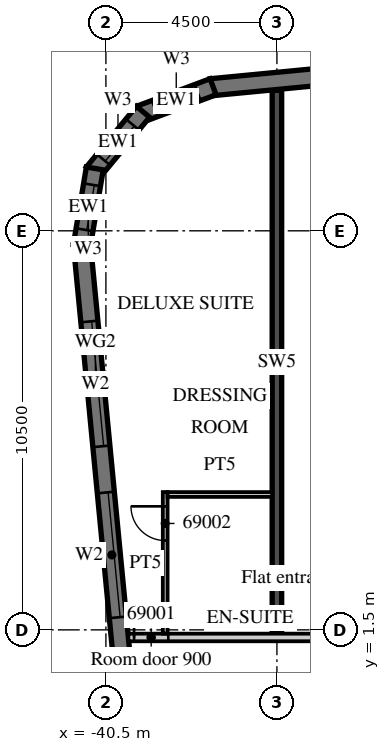
"""IFC4 building model, lengths in metres.
Left out: names, types, materials, properties, quantities, classifications, styles, units other than length and angle.
Written with IfcOpenShell. Run it as: python <this file> out.ifc"""

import sys

from ifc_helpers import new_model, si_unit, direction, frame, frame_2d, origin, place, context, subcontext, project, spatial, polyline, rectangle, outline, extrude, element, fill, save


model = new_model("IFC4")
c1 = context("Model", 3, precision=1e-05, world=origin(), true_north=direction((0.0, 1.0)))
c2 = subcontext(c1, "Body", "Model", "MODEL_VIEW")
j1 = project(units=[si_unit("LENGTHUNIT", "METRE"), si_unit("PLANEANGLEUNIT", "RADIAN")], contexts=[c1])
p1 = place(None, origin())
s1 = spatial("IfcSite", under=j1, at=p1, CompositionType="ELEMENT")
p2 = place(p1, origin())
s2 = spatial("IfcBuilding", under=s1, at=p2, CompositionType="ELEMENT")
p3 = place(p2, frame((0.0, 0.0, 278.4)))
s3 = spatial("IfcBuildingStorey", under=s2, at=p3, CompositionType="ELEMENT", Elevation=278.4)
p4 = place(p3, frame((-36.0, 1.4, 0.0), z_axis=(0.0, 0.0, 1.0), x_axis=(0.0, 1.0, 0.0)))
e1 = element("IfcWall", 1, at=p4, inside=s3, PredefinedType="SHEAR", context=c2, shape_type="SweptSolid", body=[
    extrude(rectangle(XDim=14.296, YDim=0.25, at=frame_2d((7.148, 0.0))), origin(), (0.0, 0.0, 1.0), 3.3),
])
p5 = place(p3, frame((-41.132, 11.658, 0.0), z_axis=(0.0, 0.0, 1.0), x_axis=(0.095847749461, -0.995396006082, 0.0)))
e2 = element("IfcWall", 2, at=p5, inside=s3, PredefinedType="SOLIDWALL", context=c2, shape_type="SweptSolid", body=[
    extrude(rectangle(XDim=32.0, YDim=0.45, at=frame_2d((16.0, 0.0))), origin(), (0.0, 0.0, 1.0), 3.02),
])
p6 = place(p5, frame((2.053, 0.0, 0.45)))
e3 = element("IfcOpeningElement", 3, at=p6, cuts=e2, PredefinedType="OPENING", context=c2, shape_type="SweptSolid", body=[
    extrude(rectangle(XDim=3.3, YDim=2.25, at=frame_2d((1.65, 1.125))), frame((0.0, 0.235, 0.0), z_axis=(0.0, -1.0, 0.0), x_axis=(1.0, 0.0, 0.0)), (0.0, 0.0, 1.0), 0.47),
])
p7 = place(p5, frame((6.574, 0.0, 0.45)))
e4 = element("IfcOpeningElement", 4, at=p7, cuts=e2, PredefinedType="OPENING", context=c2, shape_type="SweptSolid", body=[
    extrude(rectangle(XDim=3.3, YDim=2.25, at=frame_2d((1.65, 1.125))), frame((0.0, 0.235, 0.0), z_axis=(0.0, -1.0, 0.0), x_axis=(1.0, 0.0, 0.0)), (0.0, 0.0, 1.0), 0.47),
])
p8 = place(p3, frame((13.521, 20.713, 0.0), z_axis=(0.0, 0.0, 1.0), x_axis=(-0.995396277313, -0.095844932638, 0.0)))
e5 = element("IfcWall", 5, at=p8, inside=s3, PredefinedType="SOLIDWALL", context=c2, shape_type="SweptSolid", body=[
    extrude(rectangle(XDim=51.495, YDim=0.45, at=frame_2d((25.748, 0.0))), origin(), (0.0, 0.0, 1.0), 3.02),
])
p9 = place(p8, frame((0.91, 0.0, 0.45)))
e6 = element("IfcOpeningElement", 6, at=p9, cuts=e5, PredefinedType="OPENING", context=c2, shape_type="SweptSolid", body=[
    extrude(rectangle(XDim=2.7, YDim=2.25, at=frame_2d((1.35, 1.125))), frame((0.0, 0.235, 0.0), z_axis=(0.0, -1.0, 0.0), x_axis=(1.0, 0.0, 0.0)), (0.0, 0.0, 1.0), 0.47),
])
p10 = place(p8, frame((5.431, 0.0, 0.45)))
e7 = element("IfcOpeningElement", 7, at=p10, cuts=e5, PredefinedType="OPENING", context=c2, shape_type="SweptSolid", body=[
    extrude(rectangle(XDim=2.7, YDim=2.25, at=frame_2d((1.35, 1.125))), frame((0.0, 0.235, 0.0), z_axis=(0.0, -1.0, 0.0), x_axis=(1.0, 0.0, 0.0)), (0.0, 0.0, 1.0), 0.47),
])
p11 = place(p8, frame((9.952, 0.0, 0.45)))
e8 = element("IfcOpeningElement", 8, at=p11, cuts=e5, PredefinedType="OPENING", context=c2, shape_type="SweptSolid", body=[
    extrude(rectangle(XDim=2.7, YDim=2.25, at=frame_2d((1.35, 1.125))), frame((0.0, 0.235, 0.0), z_axis=(0.0, -1.0, 0.0), x_axis=(1.0, 0.0, 0.0)), (0.0, 0.0, 1.0), 0.47),
])
p12 = place(p8, frame((14.473, 0.0, 0.45)))
e9 = element("IfcOpeningElement", 9, at=p12, cuts=e5, PredefinedType="OPENING", context=c2, shape_type="SweptSolid", body=[
    extrude(rectangle(XDim=2.7, YDim=2.25, at=frame_2d((1.35, 1.125))), frame((0.0, 0.235, 0.0), z_axis=(0.0, -1.0, 0.0), x_axis=(1.0, 0.0, 0.0)), (0.0, 0.0, 1.0), 0.47),
])
p13 = place(p8, frame((18.994, 0.0, 0.45)))
e10 = element("IfcOpeningElement", 10, at=p13, cuts=e5, PredefinedType="OPENING", context=c2, shape_type="SweptSolid", body=[
    extrude(rectangle(XDim=2.7, YDim=2.25, at=frame_2d((1.35, 1.125))), frame((0.0, 0.235, 0.0), z_axis=(0.0, -1.0, 0.0), x_axis=(1.0, 0.0, 0.0)), (0.0, 0.0, 1.0), 0.47),
])
p14 = place(p8, frame((23.514, 0.0, 0.45)))
e11 = element("IfcOpeningElement", 11, at=p14, cuts=e5, PredefinedType="OPENING", context=c2, shape_type="SweptSolid", body=[
    extrude(rectangle(XDim=2.7, YDim=2.25, at=frame_2d((1.35, 1.125))), frame((0.0, 0.235, 0.0), z_axis=(0.0, -1.0, 0.0), x_axis=(1.0, 0.0, 0.0)), (0.0, 0.0, 1.0), 0.47),
])
p15 = place(p8, frame((28.035, 0.0, 0.45)))
e12 = element("IfcOpeningElement", 12, at=p15, cuts=e5, PredefinedType="OPENING", context=c2, shape_type="SweptSolid", body=[
    extrude(rectangle(XDim=2.7, YDim=2.25, at=frame_2d((1.35, 1.125))), frame((0.0, 0.235, 0.0), z_axis=(0.0, -1.0, 0.0), x_axis=(1.0, 0.0, 0.0)), (0.0, 0.0, 1.0), 0.47),
])
p16 = place(p8, frame((32.556, 0.0, 0.45)))
e13 = element("IfcOpeningElement", 13, at=p16, cuts=e5, PredefinedType="OPENING", context=c2, shape_type="SweptSolid", body=[
    extrude(rectangle(XDim=2.7, YDim=2.25, at=frame_2d((1.35, 1.125))), frame((0.0, 0.235, 0.0), z_axis=(0.0, -1.0, 0.0), x_axis=(1.0, 0.0, 0.0)), (0.0, 0.0, 1.0), 0.47),
])
p17 = place(p8, frame((37.077, 0.0, 0.45)))
e14 = element("IfcOpeningElement", 14, at=p17, cuts=e5, PredefinedType="OPENING", context=c2, shape_type="SweptSolid", body=[
    extrude(rectangle(XDim=2.7, YDim=2.25, at=frame_2d((1.35, 1.125))), frame((0.0, 0.235, 0.0), z_axis=(0.0, -1.0, 0.0), x_axis=(1.0, 0.0, 0.0)), (0.0, 0.0, 1.0), 0.47),
])
p18 = place(p8, frame((41.598, 0.0, 0.45)))
e15 = element("IfcOpeningElement", 15, at=p18, cuts=e5, PredefinedType="OPENING", context=c2, shape_type="SweptSolid", body=[
    extrude(rectangle(XDim=2.7, YDim=2.25, at=frame_2d((1.35, 1.125))), frame((0.0, 0.235, 0.0), z_axis=(0.0, -1.0, 0.0), x_axis=(1.0, 0.0, 0.0)), (0.0, 0.0, 1.0), 0.47),
])
p19 = place(p8, frame((46.118, 0.0, 0.45)))
e16 = element("IfcOpeningElement", 16, at=p19, cuts=e5, PredefinedType="OPENING", context=c2, shape_type="SweptSolid", body=[
    extrude(rectangle(XDim=2.7, YDim=2.25, at=frame_2d((1.35, 1.125))), frame((0.0, 0.235, 0.0), z_axis=(0.0, -1.0, 0.0), x_axis=(1.0, 0.0, 0.0)), (0.0, 0.0, 1.0), 0.47),
])
p20 = place(p3, frame((-37.679, 15.791, 0.0), z_axis=(0.0, 0.0, 1.0), x_axis=(-0.936677599948, -0.350192909346, 0.0)))
e17 = element("IfcWall", 17, at=p20, inside=s3, PredefinedType="SOLIDWALL", context=c2, shape_type="SweptSolid", body=[
    extrude(outline(polyline([(0.0, -0.225), (2.071, -0.225), (1.95, 0.225), (0.121, 0.225), (0.0, -0.225)])), origin(), (0.0, 0.0, 1.0), 3.02),
])
p21 = place(p20, frame((0.435, 0.0, 0.45)))
e18 = element("IfcOpeningElement", 18, at=p21, cuts=e17, PredefinedType="OPENING", context=c2, shape_type="SweptSolid", body=[
    extrude(rectangle(XDim=1.2, YDim=2.25, at=frame_2d((0.6, 1.125))), frame((0.0, 0.235, 0.0), z_axis=(0.0, -1.0, 0.0), x_axis=(1.0, 0.0, 0.0)), (0.0, 0.0, 1.0), 0.47),
])
p22 = place(p3, frame((-39.524, 15.133, 0.0), z_axis=(0.0, 0.0, 1.0), x_axis=(-0.636046112757, -0.771651049663, 0.0)))
e19 = element("IfcWall", 19, at=p22, inside=s3, PredefinedType="SOLIDWALL", context=c2, shape_type="SweptSolid", body=[
    extrude(outline(polyline([(0.0, -0.225), (2.071, -0.225), (1.95, 0.225), (0.121, 0.225), (0.0, -0.225)])), origin(), (0.0, 0.0, 1.0), 3.02),
])
p23 = place(p22, frame((0.435, 0.0, 0.45)))
e20 = element("IfcOpeningElement", 20, at=p23, cuts=e19, PredefinedType="OPENING", context=c2, shape_type="SweptSolid", body=[
    extrude(rectangle(XDim=1.2, YDim=2.25, at=frame_2d((0.6, 1.125))), frame((0.0, 0.235, 0.0), z_axis=(0.0, -1.0, 0.0), x_axis=(1.0, 0.0, 0.0)), (0.0, 0.0, 1.0), 0.47),
])
p24 = place(p3, frame((-40.792, 13.641, 0.0), z_axis=(0.0, 0.0, 1.0), x_axis=(-0.165068144653, -0.986282164302, 0.0)))
e21 = element("IfcWall", 21, at=p24, inside=s3, PredefinedType="SOLIDWALL", context=c2, shape_type="SweptSolid", body=[
    extrude(outline(polyline([(0.0, -0.225), (2.071, -0.225), (1.95, 0.225), (0.121, 0.225), (0.0, -0.225)])), origin(), (0.0, 0.0, 1.0), 3.02),
])
p25 = place(p24, frame((0.435, 0.0, 0.45)))
e22 = element("IfcOpeningElement", 22, at=p25, cuts=e21, PredefinedType="OPENING", context=c2, shape_type="SweptSolid", body=[
    extrude(rectangle(XDim=1.2, YDim=2.25, at=frame_2d((0.6, 1.125))), frame((0.0, 0.235, 0.0), z_axis=(0.0, -1.0, 0.0), x_axis=(1.0, 0.0, 0.0)), (0.0, 0.0, 1.0), 0.47),
])
p26 = place(p3, frame((-39.909, 1.3, 0.0), z_axis=(0.0, 0.0, 1.0), x_axis=(1.0, 0.0, 0.0)))
e23 = element("IfcWall", 23, at=p26, inside=s3, PredefinedType="PARTITIONING", context=c2, shape_type="SweptSolid", body=[
    extrude(rectangle(XDim=53.409, YDim=0.2, at=frame_2d((26.705, 0.0))), origin(), (0.0, 0.0, 1.0), 3.02),
])
p27 = place(p26, frame((0.15, 0.0, 0.0)))
e24 = element("IfcOpeningElement", 24, at=p27, cuts=e23, PredefinedType="OPENING", context=c2, shape_type="SweptSolid", body=[
    extrude(rectangle(XDim=0.9, YDim=2.1, at=frame_2d((0.45, 1.05))), frame((0.0, 0.11, 0.0), z_axis=(0.0, -1.0, 0.0), x_axis=(1.0, 0.0, 0.0)), (0.0, 0.0, 1.0), 0.22),
])
p28 = place(p26, frame((6.347, 0.0, 0.0)))
e25 = element("IfcOpeningElement", 25, at=p28, cuts=e23, PredefinedType="OPENING", context=c2, shape_type="SweptSolid", body=[
    extrude(rectangle(XDim=1.2, YDim=2.1, at=frame_2d((0.6, 1.05))), frame((0.0, 0.11, 0.0), z_axis=(0.0, -1.0, 0.0), x_axis=(1.0, 0.0, 0.0)), (0.0, 0.0, 1.0), 0.22),
])
p29 = place(p26, frame((15.347, 0.0, 0.0)))
e26 = element("IfcOpeningElement", 26, at=p29, cuts=e23, PredefinedType="OPENING", context=c2, shape_type="SweptSolid", body=[
    extrude(rectangle(XDim=1.2, YDim=2.1, at=frame_2d((0.6, 1.05))), frame((0.0, 0.11, 0.0), z_axis=(0.0, -1.0, 0.0), x_axis=(1.0, 0.0, 0.0)), (0.0, 0.0, 1.0), 0.22),
])
p30 = place(p26, frame((24.346, 0.0, 0.0)))
e27 = element("IfcOpeningElement", 27, at=p30, cuts=e23, PredefinedType="OPENING", context=c2, shape_type="SweptSolid", body=[
    extrude(rectangle(XDim=1.2, YDim=2.1, at=frame_2d((0.6, 1.05))), frame((0.0, 0.11, 0.0), z_axis=(0.0, -1.0, 0.0), x_axis=(1.0, 0.0, 0.0)), (0.0, 0.0, 1.0), 0.22),
])
p31 = place(p26, frame((33.346, 0.0, 0.0)))
e28 = element("IfcOpeningElement", 28, at=p31, cuts=e23, PredefinedType="OPENING", context=c2, shape_type="SweptSolid", body=[
    extrude(rectangle(XDim=1.2, YDim=2.1, at=frame_2d((0.6, 1.05))), frame((0.0, 0.11, 0.0), z_axis=(0.0, -1.0, 0.0), x_axis=(1.0, 0.0, 0.0)), (0.0, 0.0, 1.0), 0.22),
])
p32 = place(p26, frame((42.346, 0.0, 0.0)))
e29 = element("IfcOpeningElement", 29, at=p32, cuts=e23, PredefinedType="OPENING", context=c2, shape_type="SweptSolid", body=[
    extrude(rectangle(XDim=1.2, YDim=2.1, at=frame_2d((0.6, 1.05))), frame((0.0, 0.11, 0.0), z_axis=(0.0, -1.0, 0.0), x_axis=(1.0, 0.0, 0.0)), (0.0, 0.0, 1.0), 0.22),
])
p33 = place(p26, frame((51.834, 0.0, 0.0)))
e30 = element("IfcOpeningElement", 30, at=p33, cuts=e23, PredefinedType="OPENING", context=c2, shape_type="SweptSolid", body=[
    extrude(rectangle(XDim=1.0, YDim=2.1, at=frame_2d((0.5, 1.05))), frame((0.0, 0.11, 0.0), z_axis=(0.0, -1.0, 0.0), x_axis=(1.0, 0.0, 0.0)), (0.0, 0.0, 1.0), 0.22),
])
p34 = place(p3, frame((-38.94, 1.4, 0.0), z_axis=(0.0, 0.0, 1.0), x_axis=(0.0, 1.0, 0.0)))
e31 = element("IfcWall", 31, at=p34, inside=s3, PredefinedType="PARTITIONING", context=c2, shape_type="SweptSolid", body=[
    extrude(rectangle(XDim=3.725, YDim=0.125, at=frame_2d((1.863, 0.0))), origin(), (0.0, 0.0, 1.0), 3.02),
])
p35 = place(p34, frame((2.45, 0.0, 0.0)))
e32 = element("IfcOpeningElement", 32, at=p35, cuts=e31, PredefinedType="OPENING", context=c2, shape_type="SweptSolid", body=[
    extrude(rectangle(XDim=0.9, YDim=2.1, at=frame_2d((0.45, 1.05))), frame((0.0, 0.073, 0.0), z_axis=(0.0, -1.0, 0.0), x_axis=(1.0, 0.0, 0.0)), (0.0, 0.0, 1.0), 0.145),
])
p36 = place(p3, frame((-38.878, 5.062, 0.0), z_axis=(0.0, 0.0, 1.0), x_axis=(1.0, 0.0, 0.0)))
e33 = element("IfcWall", 33, at=p36, inside=s3, PredefinedType="PARTITIONING", context=c2, shape_type="SweptSolid", body=[
    extrude(rectangle(XDim=2.753, YDim=0.125, at=frame_2d((1.376, 0.0))), origin(), (0.0, 0.0, 1.0), 3.02),
])
p37 = place(p6, origin())
e34 = element("IfcWindow", 34, at=p37, inside=s3, PartitioningType="SINGLE_PANEL", PredefinedType="WINDOW", context=c2, shape_type="SweptSolid", body=[
    extrude(rectangle(XDim=3.3, YDim=2.25, at=frame_2d((1.65, 1.125))), frame((0.0, 0.09, 0.0), z_axis=(0.0, -1.0, 0.0), x_axis=(1.0, 0.0, 0.0)), (0.0, 0.0, 1.0), 0.06),
])
fill(e3, e34)
p38 = place(p7, origin())
e35 = element("IfcWindow", 35, at=p38, inside=s3, PartitioningType="SINGLE_PANEL", PredefinedType="WINDOW", context=c2, shape_type="SweptSolid", body=[
    extrude(rectangle(XDim=3.3, YDim=2.25, at=frame_2d((1.65, 1.125))), frame((0.0, 0.09, 0.0), z_axis=(0.0, -1.0, 0.0), x_axis=(1.0, 0.0, 0.0)), (0.0, 0.0, 1.0), 0.06),
])
fill(e4, e35)
p39 = place(p21, origin())
e36 = element("IfcWindow", 36, at=p39, inside=s3, PartitioningType="SINGLE_PANEL", PredefinedType="WINDOW", context=c2, shape_type="SweptSolid", body=[
    extrude(rectangle(XDim=1.2, YDim=2.25, at=frame_2d((0.6, 1.125))), frame((0.0, 0.09, 0.0), z_axis=(0.0, -1.0, 0.0), x_axis=(1.0, 0.0, 0.0)), (0.0, 0.0, 1.0), 0.06),
])
fill(e18, e36)
p40 = place(p23, origin())
e37 = element("IfcWindow", 37, at=p40, inside=s3, PartitioningType="SINGLE_PANEL", PredefinedType="WINDOW", context=c2, shape_type="SweptSolid", body=[
    extrude(rectangle(XDim=1.2, YDim=2.25, at=frame_2d((0.6, 1.125))), frame((0.0, 0.09, 0.0), z_axis=(0.0, -1.0, 0.0), x_axis=(1.0, 0.0, 0.0)), (0.0, 0.0, 1.0), 0.06),
])
fill(e20, e37)
p41 = place(p25, origin())
e38 = element("IfcWindow", 38, at=p41, inside=s3, PartitioningType="SINGLE_PANEL", PredefinedType="WINDOW", context=c2, shape_type="SweptSolid", body=[
    extrude(rectangle(XDim=1.2, YDim=2.25, at=frame_2d((0.6, 1.125))), frame((0.0, 0.09, 0.0), z_axis=(0.0, -1.0, 0.0), x_axis=(1.0, 0.0, 0.0)), (0.0, 0.0, 1.0), 0.06),
])
fill(e22, e38)
p42 = place(p27, origin())
e39 = element("IfcDoor", 39, at=p42, inside=s3, OperationType="SINGLE_SWING_LEFT", PredefinedType="DOOR", context=c2, shape_type="SweptSolid", body=[
    extrude(rectangle(XDim=0.9, YDim=2.1, at=frame_2d((0.45, 1.05))), frame((0.0, 0.025, 0.0), z_axis=(0.0, -1.0, 0.0), x_axis=(1.0, 0.0, 0.0)), (0.0, 0.0, 1.0), 0.05),
])
fill(e24, e39)
p43 = place(p35, origin())
e40 = element("IfcDoor", 40, at=p43, inside=s3, OperationType="SINGLE_SWING_RIGHT", PredefinedType="DOOR", context=c2, shape_type="SweptSolid", body=[
    extrude(rectangle(XDim=0.9, YDim=2.1, at=frame_2d((0.45, 1.05))), frame((0.0, 0.025, 0.0), z_axis=(0.0, -1.0, 0.0), x_axis=(1.0, 0.0, 0.0)), (0.0, 0.0, 1.0), 0.05),
])
fill(e32, e40)
save(model, sys.argv[1])
